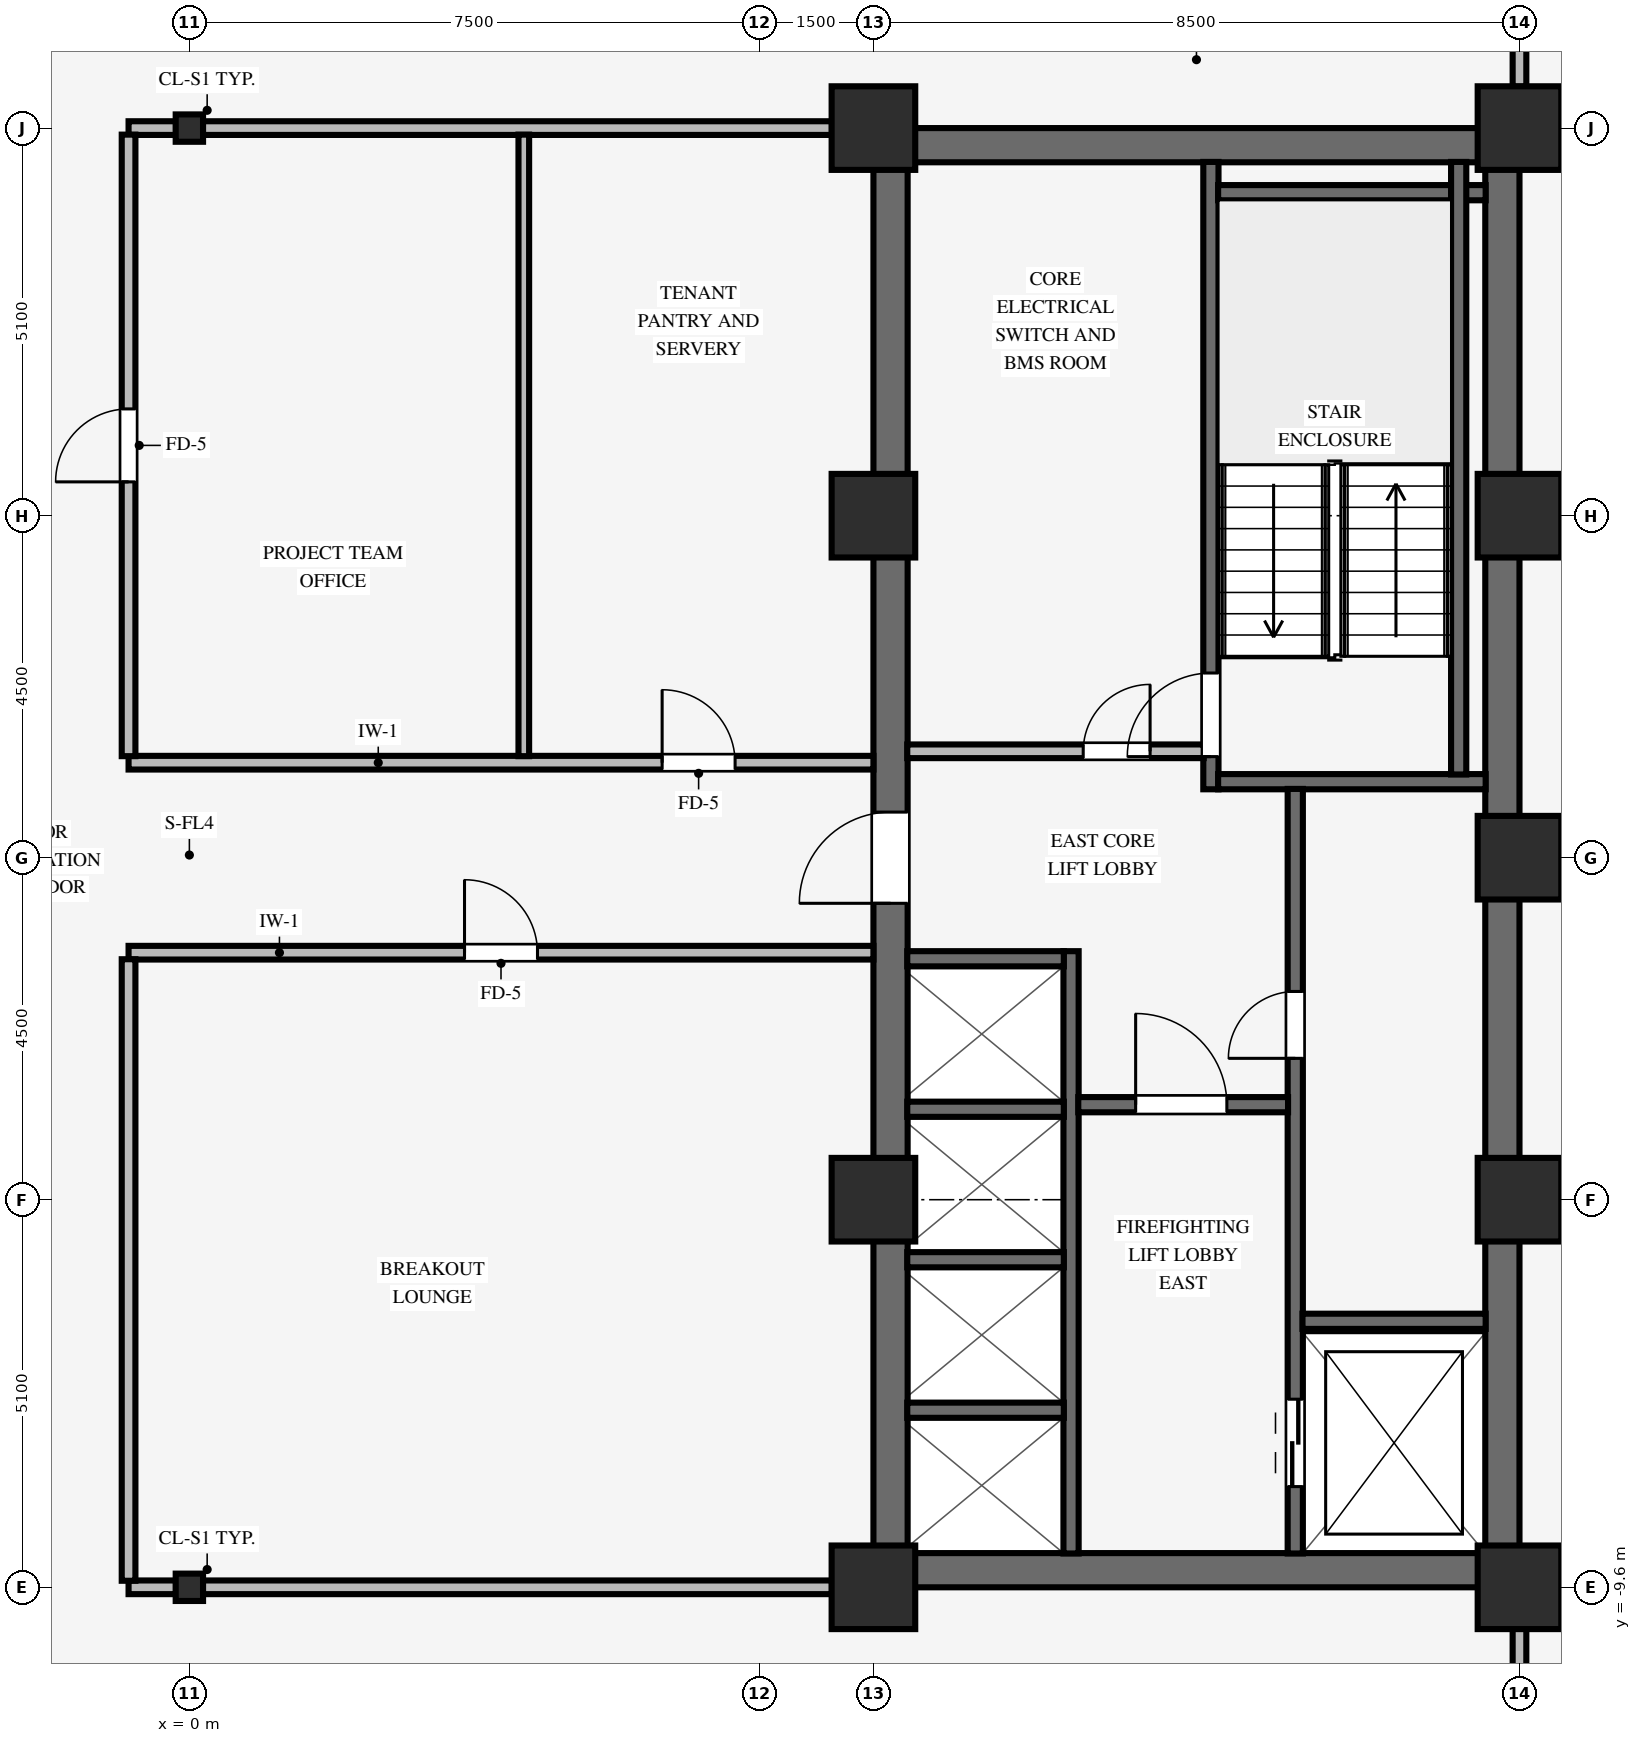
"""IFC4 building model, lengths in metres.
Left out: names, types, materials, properties, quantities, classifications, styles, units other than length and angle.
Written with IfcOpenShell. Run it as: python <this file> out.ifc"""

import sys

from ifc_helpers import new_model, si_unit, direction, frame, frame_2d, origin, origin_2d, place, context, subcontext, project, spatial, rectangle, i_section, extrude, source, transform, mapped, element, fill, save


model = new_model("IFC4")
c1 = context("Model", 3, precision=1e-05, world=origin(), true_north=direction((0.0, 1.0)))
c2 = subcontext(c1, "Body", "Model", "MODEL_VIEW")
j1 = project(units=[si_unit("LENGTHUNIT", "METRE"), si_unit("PLANEANGLEUNIT", "RADIAN")], contexts=[c1])
p1 = place(None, origin())
s1 = spatial("IfcSite", under=j1, at=p1, CompositionType="ELEMENT")
p2 = place(p1, origin())
s2 = spatial("IfcBuilding", under=s1, at=p2, CompositionType="ELEMENT")
p3 = place(p2, frame((0.0, 0.0, 75.05)))
s3 = spatial("IfcBuildingStorey", under=s2, at=p3, CompositionType="ELEMENT", Elevation=75.05)
for number, where, z_axis, x_axis in (
    (1, (9.0, -9.375, 0.0), (0.0, 0.0, 1.0), (1.0, 0.0, 0.0)),
    (2, (9.0, 9.375, 0.0), (0.0, 0.0, 1.0), (1.0, 0.0, 0.0)),
):
    element("IfcWall", number, at=place(p3, frame(where, z_axis=z_axis, x_axis=x_axis)), inside=s3, PredefinedType="SHEAR", context=c2, shape_type="SweptSolid", body=[
        extrude(rectangle(XDim=8.5, YDim=0.45, at=frame_2d((4.25, 0.0))), origin(), (0.0, 0.0, 1.0), 3.37),
    ])
p4 = place(p3, frame((9.225, -9.155, 0.0), z_axis=(0.0, 0.0, 1.0), x_axis=(0.0, 1.0, 0.0)))
e3 = element("IfcWall", 3, at=p4, inside=s3, PredefinedType="SHEAR", context=c2, shape_type="SweptSolid", body=[
    extrude(rectangle(XDim=18.31, YDim=0.45, at=frame_2d((9.155, 0.0))), origin(), (0.0, 0.0, 1.0), 3.37),
])
p5 = place(p4, frame((8.555, 0.0, 0.0)))
e4 = element("IfcOpeningElement", 4, at=p5, cuts=e3, PredefinedType="OPENING", context=c2, shape_type="SweptSolid", body=[
    extrude(rectangle(XDim=1.2, YDim=2.15, at=frame_2d((0.6, 1.075))), frame((0.0, 0.235, 0.0), z_axis=(0.0, -1.0, 0.0), x_axis=(1.0, 0.0, 0.0)), (0.0, 0.0, 1.0), 0.47),
])
p6 = place(p3, frame((17.275, -9.155, 0.0), z_axis=(0.0, 0.0, 1.0), x_axis=(0.0, 1.0, 0.0)))
e5 = element("IfcWall", 5, at=p6, inside=s3, PredefinedType="SHEAR", context=c2, shape_type="SweptSolid", body=[
    extrude(rectangle(XDim=18.31, YDim=0.45, at=frame_2d((9.155, 0.0))), origin(), (0.0, 0.0, 1.0), 3.37),
])
for number, where, z_axis, x_axis in (
    (6, (9.0, -9.6, 0.0), (0.0, 0.0, 1.0), (1.0, 0.0, 0.0)),
    (7, (9.0, -4.5, 0.0), (0.0, 0.0, 1.0), (1.0, 0.0, 0.0)),
    (8, (9.0, 4.5, 0.0), (0.0, 0.0, 1.0), (1.0, 0.0, 0.0)),
    (9, (9.0, 9.6, 0.0), (0.0, 0.0, 1.0), (1.0, 0.0, 0.0)),
    (10, (17.5, -9.6, 0.0), (0.0, 0.0, 1.0), (1.0, 0.0, 0.0)),
    (11, (17.5, -4.5, 0.0), (0.0, 0.0, 1.0), (1.0, 0.0, 0.0)),
    (12, (17.5, 4.5, 0.0), (0.0, 0.0, 1.0), (1.0, 0.0, 0.0)),
    (13, (17.5, 9.6, 0.0), (0.0, 0.0, 1.0), (1.0, 0.0, 0.0)),
    (14, (17.5, 0.0, 0.0), (0.0, 0.0, 1.0), (1.0, 0.0, 0.0)),
):
    element("IfcColumn", number, at=place(p3, frame(where, z_axis=z_axis, x_axis=x_axis)), inside=s3, PredefinedType="COLUMN", context=c2, shape_type="SweptSolid", body=[
        extrude(rectangle(XDim=1.1, YDim=1.1, at=origin_2d()), origin(), (0.0, 0.0, 1.0), 3.37),
    ])
for number, where, z_axis, x_axis in (
    (15, (0.0, -9.6, 0.0), (0.0, 0.0, 1.0), (1.0, 0.0, 0.0)),
    (16, (0.0, 9.6, 0.0), (0.0, 0.0, 1.0), (1.0, 0.0, 0.0)),
):
    element("IfcColumn", number, at=place(p3, frame(where, z_axis=z_axis, x_axis=x_axis)), inside=s3, PredefinedType="COLUMN", context=c2, shape_type="SweptSolid", body=[
        extrude(i_section(OverallWidth=0.36, OverallDepth=0.36, WebThickness=0.021, FlangeThickness=0.021, FilletRadius=0.018, at=origin_2d()), origin(), (0.0, 0.0, 1.0), 3.37),
    ])
p7 = place(p3, frame((13.44, 0.9, 0.0), z_axis=(0.0, 0.0, 1.0), x_axis=(0.0, 1.0, 0.0)))
e17 = element("IfcWall", 17, at=p7, inside=s3, PredefinedType="SHEAR", context=c2, shape_type="SweptSolid", body=[
    extrude(rectangle(XDim=8.255, YDim=0.2, at=frame_2d((4.127, 0.0))), origin(), (0.0, 0.0, 1.0), 3.37),
])
p8 = place(p7, frame((0.43, 0.0, 0.0)))
e18 = element("IfcOpeningElement", 18, at=p8, cuts=e17, PredefinedType="OPENING", context=c2, shape_type="SweptSolid", body=[
    extrude(rectangle(XDim=1.1, YDim=2.15, at=frame_2d((0.55, 1.075))), frame((0.0, 0.11, 0.0), z_axis=(0.0, -1.0, 0.0), x_axis=(1.0, 0.0, 0.0)), (0.0, 0.0, 1.0), 0.22),
])
for number, where, z_axis, x_axis in (
    (19, (13.535, 1.0, 0.0), (0.0, 0.0, 1.0), (1.0, 0.0, 0.0)),
    (20, (13.535, 8.75, 0.0), (0.0, 0.0, 1.0), (1.0, 0.0, 0.0)),
):
    element("IfcWall", number, at=place(p3, frame(where, z_axis=z_axis, x_axis=x_axis)), inside=s3, PredefinedType="SHEAR", context=c2, shape_type="SweptSolid", body=[
        extrude(rectangle(XDim=3.52, YDim=0.2, at=frame_2d((1.76, 0.0))), origin(), (0.0, 0.0, 1.0), 3.37),
    ])
p9 = place(p3, frame((16.7, 1.095, 0.0), z_axis=(0.0, 0.0, 1.0), x_axis=(0.0, 1.0, 0.0)))
e21 = element("IfcWall", 21, at=p9, inside=s3, PredefinedType="SHEAR", context=c2, shape_type="SweptSolid", body=[
    extrude(rectangle(XDim=8.06, YDim=0.2, at=frame_2d((4.03, 0.0))), origin(), (0.0, 0.0, 1.0), 3.37),
])
p10 = place(p3, frame((14.55, -9.155, 0.0), z_axis=(0.0, 0.0, 1.0), x_axis=(0.0, 1.0, 0.0)))
e22 = element("IfcWall", 22, at=p10, inside=s3, PredefinedType="SHEAR", context=c2, shape_type="SweptSolid", body=[
    extrude(rectangle(XDim=10.06, YDim=0.2, at=frame_2d((5.03, 0.0))), origin(), (0.0, 0.0, 1.0), 3.37),
])
p11 = place(p10, frame((6.515, 0.0, 0.0)))
e23 = element("IfcOpeningElement", 23, at=p11, cuts=e22, PredefinedType="OPENING", context=c2, shape_type="SweptSolid", body=[
    extrude(rectangle(XDim=0.88, YDim=2.1, at=frame_2d((0.44, 1.05))), frame((0.0, 0.11, 0.0), z_axis=(0.0, -1.0, 0.0), x_axis=(1.0, 0.0, 0.0)), (0.0, 0.0, 1.0), 0.22),
])
p12 = place(p10, frame((0.88, 0.0, 0.0)))
e24 = element("IfcOpeningElement", 24, at=p12, cuts=e22, PredefinedType="OPENING", context=c2, shape_type="SweptSolid", body=[
    extrude(rectangle(XDim=1.15, YDim=2.15, at=frame_2d((0.575, 1.075))), frame((0.0, 0.11, 0.0), z_axis=(0.0, -1.0, 0.0), x_axis=(1.0, 0.0, 0.0)), (0.0, 0.0, 1.0), 0.22),
])
p13 = place(p3, frame((14.645, -6.1, 0.0), z_axis=(0.0, 0.0, 1.0), x_axis=(1.0, 0.0, 0.0)))
e25 = element("IfcWall", 25, at=p13, inside=s3, PredefinedType="SHEAR", context=c2, shape_type="SweptSolid", body=[
    extrude(rectangle(XDim=2.41, YDim=0.2, at=frame_2d((1.205, 0.0))), origin(), (0.0, 0.0, 1.0), 3.37),
])
p14 = place(p3, frame((11.6, -9.155, 0.0), z_axis=(0.0, 0.0, 1.0), x_axis=(0.0, 1.0, 0.0)))
e26 = element("IfcWall", 26, at=p14, inside=s3, PredefinedType="SHEAR", context=c2, shape_type="SweptSolid", body=[
    extrude(rectangle(XDim=7.925, YDim=0.2, at=frame_2d((3.962, 0.0))), origin(), (0.0, 0.0, 1.0), 3.37),
])
p15 = place(p3, frame((11.695, -3.25, 0.0), z_axis=(0.0, 0.0, 1.0), x_axis=(1.0, 0.0, 0.0)))
e27 = element("IfcWall", 27, at=p15, inside=s3, PredefinedType="SHEAR", context=c2, shape_type="SweptSolid", body=[
    extrude(rectangle(XDim=2.76, YDim=0.2, at=frame_2d((1.38, 0.0))), origin(), (0.0, 0.0, 1.0), 3.37),
])
p16 = place(p15, frame((0.755, 0.0, 0.0)))
e28 = element("IfcOpeningElement", 28, at=p16, cuts=e27, PredefinedType="OPENING", context=c2, shape_type="SweptSolid", body=[
    extrude(rectangle(XDim=1.2, YDim=2.15, at=frame_2d((0.6, 1.075))), frame((0.0, 0.11, 0.0), z_axis=(0.0, -1.0, 0.0), x_axis=(1.0, 0.0, 0.0)), (0.0, 0.0, 1.0), 0.22),
])
for number, where, z_axis, x_axis in (
    (29, (9.445, -7.27, 0.0), (0.0, 0.0, 1.0), (1.0, 0.0, 0.0)),
    (30, (9.445, -5.29, 0.0), (0.0, 0.0, 1.0), (1.0, 0.0, 0.0)),
    (31, (9.445, -3.31, 0.0), (0.0, 0.0, 1.0), (1.0, 0.0, 0.0)),
    (32, (9.445, -1.33, 0.0), (0.0, 0.0, 1.0), (1.0, 0.0, 0.0)),
):
    element("IfcWall", number, at=place(p3, frame(where, z_axis=z_axis, x_axis=x_axis)), inside=s3, PredefinedType="SHEAR", context=c2, shape_type="SweptSolid", body=[
        extrude(rectangle(XDim=2.06, YDim=0.2, at=frame_2d((1.03, 0.0))), origin(), (0.0, 0.0, 1.0), 3.37),
    ])
p17 = place(p3, frame((9.445, 1.4, 0.0), z_axis=(0.0, 0.0, 1.0), x_axis=(1.0, 0.0, 0.0)))
e33 = element("IfcWall", 33, at=p17, inside=s3, PredefinedType="PARTITIONING", context=c2, shape_type="SweptSolid", body=[
    extrude(rectangle(XDim=3.9, YDim=0.18, at=frame_2d((1.95, 0.0))), origin(), (0.0, 0.0, 1.0), 3.36),
])
p18 = place(p17, frame((2.315, 0.0, 0.0)))
e34 = element("IfcOpeningElement", 34, at=p18, cuts=e33, PredefinedType="OPENING", context=c2, shape_type="SweptSolid", body=[
    extrude(rectangle(XDim=0.88, YDim=2.1, at=frame_2d((0.44, 1.05))), frame((0.0, 0.1, 0.0), z_axis=(0.0, -1.0, 0.0), x_axis=(1.0, 0.0, 0.0)), (0.0, 0.0, 1.0), 0.2),
])
p19 = place(p3, frame((-0.8, -9.6, 0.0), z_axis=(0.0, 0.0, 1.0), x_axis=(1.0, 0.0, 0.0)))
e35 = element("IfcWall", 35, at=p19, inside=s3, PredefinedType="PARTITIONING", context=c2, shape_type="SweptSolid", body=[
    extrude(rectangle(XDim=0.624, YDim=0.18, at=frame_2d((0.312, 0.0))), origin(), (0.0, 0.0, 1.0), 2.405),
])
p20 = place(p3, frame((0.176, -9.6, 0.0), z_axis=(0.0, 0.0, 1.0), x_axis=(1.0, 0.0, 0.0)))
e36 = element("IfcWall", 36, at=p20, inside=s3, PredefinedType="PARTITIONING", context=c2, shape_type="SweptSolid", body=[
    extrude(rectangle(XDim=8.278, YDim=0.18, at=frame_2d((4.139, 0.0))), origin(), (0.0, 0.0, 1.0), 2.405),
])
p21 = place(p3, frame((-0.8, -1.25, 0.0), z_axis=(0.0, 0.0, 1.0), x_axis=(1.0, 0.0, 0.0)))
e37 = element("IfcWall", 37, at=p21, inside=s3, PredefinedType="PARTITIONING", context=c2, shape_type="SweptSolid", body=[
    extrude(rectangle(XDim=9.8, YDim=0.18, at=frame_2d((4.9, 0.0))), origin(), (0.0, 0.0, 1.0), 3.36),
])
p22 = place(p21, frame((4.42, 0.0, 0.0)))
e38 = element("IfcOpeningElement", 38, at=p22, cuts=e37, PredefinedType="OPENING", context=c2, shape_type="SweptSolid", body=[
    extrude(rectangle(XDim=0.96, YDim=2.1, at=frame_2d((0.48, 1.05))), frame((0.0, 0.1, 0.0), z_axis=(0.0, -1.0, 0.0), x_axis=(1.0, 0.0, 0.0)), (0.0, 0.0, 1.0), 0.2),
])
p23 = place(p3, frame((-0.8, 1.25, 0.0), z_axis=(0.0, 0.0, 1.0), x_axis=(1.0, 0.0, 0.0)))
e39 = element("IfcWall", 39, at=p23, inside=s3, PredefinedType="PARTITIONING", context=c2, shape_type="SweptSolid", body=[
    extrude(rectangle(XDim=9.8, YDim=0.18, at=frame_2d((4.9, 0.0))), origin(), (0.0, 0.0, 1.0), 3.36),
])
p24 = place(p23, frame((7.02, 0.0, 0.0)))
e40 = element("IfcOpeningElement", 40, at=p24, cuts=e39, PredefinedType="OPENING", context=c2, shape_type="SweptSolid", body=[
    extrude(rectangle(XDim=0.96, YDim=2.1, at=frame_2d((0.48, 1.05))), frame((0.0, 0.1, 0.0), z_axis=(0.0, -1.0, 0.0), x_axis=(1.0, 0.0, 0.0)), (0.0, 0.0, 1.0), 0.2),
])
p25 = place(p3, frame((-0.8, 9.6, 0.0), z_axis=(0.0, 0.0, 1.0), x_axis=(1.0, 0.0, 0.0)))
e41 = element("IfcWall", 41, at=p25, inside=s3, PredefinedType="PARTITIONING", context=c2, shape_type="SweptSolid", body=[
    extrude(rectangle(XDim=0.624, YDim=0.18, at=frame_2d((0.312, 0.0))), origin(), (0.0, 0.0, 1.0), 2.405),
])
p26 = place(p3, frame((0.176, 9.6, 0.0), z_axis=(0.0, 0.0, 1.0), x_axis=(1.0, 0.0, 0.0)))
e42 = element("IfcWall", 42, at=p26, inside=s3, PredefinedType="PARTITIONING", context=c2, shape_type="SweptSolid", body=[
    extrude(rectangle(XDim=8.278, YDim=0.18, at=frame_2d((4.139, 0.0))), origin(), (0.0, 0.0, 1.0), 2.405),
])
p27 = place(p3, frame((-0.8, -9.514, 0.0), z_axis=(0.0, 0.0, 1.0), x_axis=(0.0, 1.0, 0.0)))
e43 = element("IfcWall", 43, at=p27, inside=s3, PredefinedType="PARTITIONING", context=c2, shape_type="SweptSolid", body=[
    extrude(rectangle(XDim=8.178, YDim=0.18, at=frame_2d((4.089, 0.0))), origin(), (0.0, 0.0, 1.0), 3.36),
])
p28 = place(p3, frame((-0.8, 1.336, 0.0), z_axis=(0.0, 0.0, 1.0), x_axis=(0.0, 1.0, 0.0)))
e44 = element("IfcWall", 44, at=p28, inside=s3, PredefinedType="PARTITIONING", context=c2, shape_type="SweptSolid", body=[
    extrude(rectangle(XDim=8.178, YDim=0.18, at=frame_2d((4.089, 0.0))), origin(), (0.0, 0.0, 1.0), 3.36),
])
p29 = place(p28, frame((3.609, 0.0, 0.0)))
e45 = element("IfcOpeningElement", 45, at=p29, cuts=e44, PredefinedType="OPENING", context=c2, shape_type="SweptSolid", body=[
    extrude(rectangle(XDim=0.96, YDim=2.1, at=frame_2d((0.48, 1.05))), frame((0.0, 0.1, 0.0), z_axis=(0.0, -1.0, 0.0), x_axis=(1.0, 0.0, 0.0)), (0.0, 0.0, 1.0), 0.2),
])
p30 = place(p3, frame((4.4, 1.336, 0.0), z_axis=(0.0, 0.0, 1.0), x_axis=(0.0, 1.0, 0.0)))
e46 = element("IfcWall", 46, at=p30, inside=s3, PredefinedType="PARTITIONING", context=c2, shape_type="SweptSolid", body=[
    extrude(rectangle(XDim=8.178, YDim=0.14, at=frame_2d((4.089, 0.0))), origin(), (0.0, 0.0, 1.0), 3.36),
])
for number, where, z_axis, x_axis in (
    (47, (17.5, -11.114, 0.0), (0.0, 0.0, 1.0), (0.0, 1.0, 0.0)),
    (48, (17.5, 10.146, 0.0), (0.0, 0.0, 1.0), (0.0, 1.0, 0.0)),
):
    element("IfcWall", number, at=place(p3, frame(where, z_axis=z_axis, x_axis=x_axis)), inside=s3, PredefinedType="PARTITIONING", context=c2, shape_type="SweptSolid", body=[
        extrude(rectangle(XDim=0.968, YDim=0.18, at=frame_2d((0.484, 0.0))), origin(), (0.0, 0.0, 1.0), 2.738),
    ])
m1 = source(origin(), c2, "Body", "SweptSolid", [
    extrude(rectangle(XDim=1.1, YDim=2.15, at=frame_2d((0.55, 1.075))), frame((0.0, 0.025, 0.0), z_axis=(0.0, -1.0, 0.0), x_axis=(1.0, 0.0, 0.0)), (0.0, 0.0, 1.0), 0.05),
])
p31 = place(p8, origin())
e49 = element("IfcDoor", 49, at=p31, inside=s3, OperationType="SINGLE_SWING_LEFT", PredefinedType="DOOR", context=c2, shape_type="MappedRepresentation", body=[
    mapped(m1, transform((0.0, 0.0, 0.0), scale=1.0)),
])
fill(e18, e49)
m2 = source(origin(), c2, "Body", "SweptSolid", [
    extrude(rectangle(XDim=0.88, YDim=2.1, at=frame_2d((0.44, 1.05))), frame((0.0, 0.025, 0.0), z_axis=(0.0, -1.0, 0.0), x_axis=(1.0, 0.0, 0.0)), (0.0, 0.0, 1.0), 0.05),
])
p32 = place(p11, origin())
e50 = element("IfcDoor", 50, at=p32, inside=s3, OperationType="SINGLE_SWING_LEFT", PredefinedType="DOOR", context=c2, shape_type="MappedRepresentation", body=[
    mapped(m2, transform((0.0, 0.0, 0.0), scale=1.0)),
])
fill(e23, e50)
m3 = source(origin(), c2, "Body", "SweptSolid", [
    extrude(rectangle(XDim=1.2, YDim=2.15, at=frame_2d((0.6, 1.075))), frame((0.0, 0.025, 0.0), z_axis=(0.0, -1.0, 0.0), x_axis=(1.0, 0.0, 0.0)), (0.0, 0.0, 1.0), 0.05),
])
p33 = place(p16, origin())
e51 = element("IfcDoor", 51, at=p33, inside=s3, OperationType="SINGLE_SWING_LEFT", PredefinedType="DOOR", context=c2, shape_type="MappedRepresentation", body=[
    mapped(m3, transform((0.0, 0.0, 0.0), scale=1.0)),
])
fill(e28, e51)
p34 = place(p5, origin())
e52 = element("IfcDoor", 52, at=p34, inside=s3, OperationType="SINGLE_SWING_LEFT", PredefinedType="DOOR", context=c2, shape_type="MappedRepresentation", body=[
    mapped(m3, transform((0.0, 0.0, 0.0), scale=1.0)),
])
fill(e4, e52)
p35 = place(p18, origin())
e53 = element("IfcDoor", 53, at=p35, inside=s3, OperationType="SINGLE_SWING_RIGHT", PredefinedType="DOOR", context=c2, shape_type="MappedRepresentation", body=[
    mapped(m2, transform((0.0, 0.0, 0.0), scale=1.0)),
])
fill(e34, e53)
m4 = source(origin(), c2, "Body", "SweptSolid", [
    extrude(rectangle(XDim=1.15, YDim=2.15, at=frame_2d((0.575, 1.075))), frame((0.0, 0.025, 0.0), z_axis=(0.0, -1.0, 0.0), x_axis=(1.0, 0.0, 0.0)), (0.0, 0.0, 1.0), 0.05),
])
p36 = place(p12, origin())
e54 = element("IfcDoor", 54, at=p36, inside=s3, OperationType="DOUBLE_DOOR_SLIDING", PredefinedType="DOOR", context=c2, shape_type="MappedRepresentation", body=[
    mapped(m4, transform((0.0, 0.0, 0.0), scale=1.0)),
])
fill(e24, e54)
m5 = source(origin(), c2, "Body", "SweptSolid", [
    extrude(rectangle(XDim=0.96, YDim=2.1, at=frame_2d((0.48, 1.05))), frame((0.0, 0.025, 0.0), z_axis=(0.0, -1.0, 0.0), x_axis=(1.0, 0.0, 0.0)), (0.0, 0.0, 1.0), 0.05),
])
p37 = place(p22, origin())
e55 = element("IfcDoor", 55, at=p37, inside=s3, OperationType="SINGLE_SWING_LEFT", PredefinedType="DOOR", context=c2, shape_type="MappedRepresentation", body=[
    mapped(m5, transform((0.0, 0.0, 0.0), scale=1.0)),
])
fill(e38, e55)
p38 = place(p29, origin())
e56 = element("IfcDoor", 56, at=p38, inside=s3, OperationType="SINGLE_SWING_LEFT", PredefinedType="DOOR", context=c2, shape_type="MappedRepresentation", body=[
    mapped(m5, transform((0.0, 0.0, 0.0), scale=1.0)),
])
fill(e45, e56)
p39 = place(p24, origin())
e57 = element("IfcDoor", 57, at=p39, inside=s3, OperationType="SINGLE_SWING_LEFT", PredefinedType="DOOR", context=c2, shape_type="MappedRepresentation", body=[
    mapped(m5, transform((0.0, 0.0, 0.0), scale=1.0)),
])
fill(e40, e57)
save(model, sys.argv[1])
